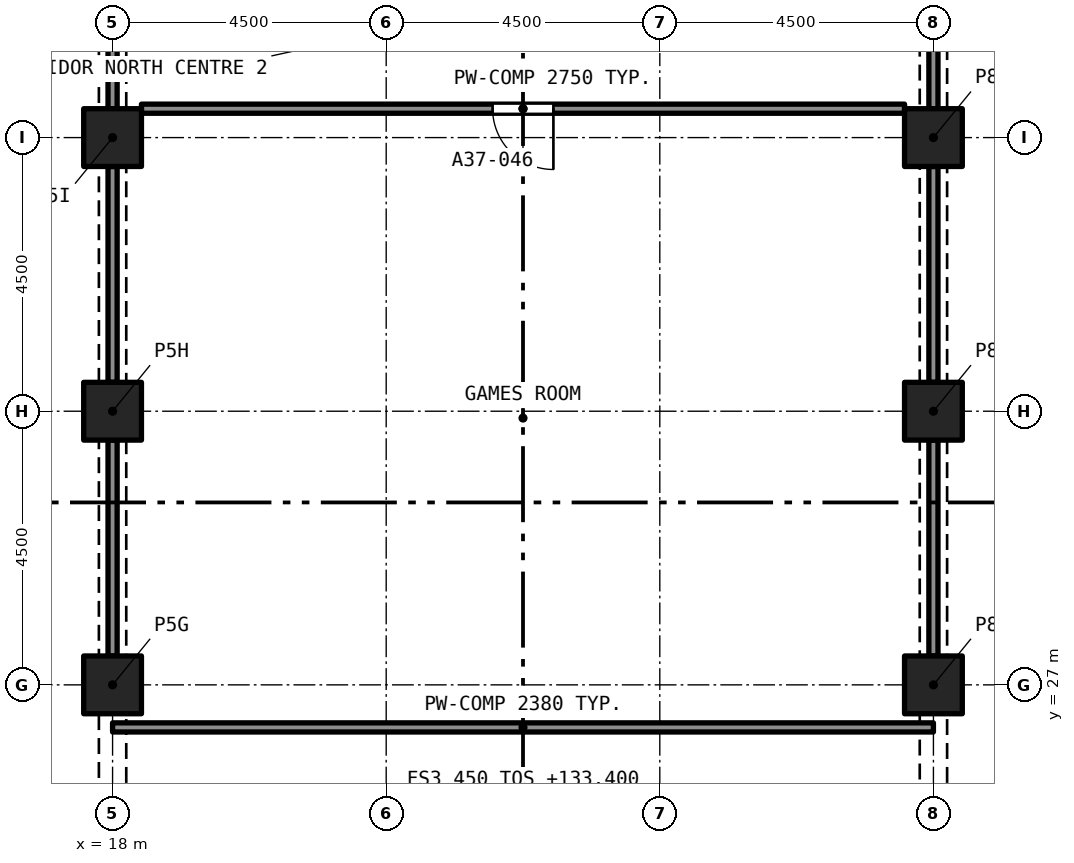
"""IFC4 building model, lengths in metres.
Left out: names, types, materials, properties, quantities, classifications, styles, units other than length and angle.
Written with IfcOpenShell. Run it as: python <this file> out.ifc"""

import sys

from ifc_helpers import new_model, si_unit, direction, frame, frame_2d, origin, origin_2d, place, context, subcontext, project, spatial, rectangle, extrude, element, fill, save


model = new_model("IFC4")
c1 = context("Model", 3, precision=1e-05, world=origin(), true_north=direction((0.0, 1.0)))
c2 = subcontext(c1, "Body", "Model", "MODEL_VIEW")
j1 = project(units=[si_unit("LENGTHUNIT", "METRE"), si_unit("PLANEANGLEUNIT", "RADIAN")], contexts=[c1])
p1 = place(None, origin())
s1 = spatial("IfcSite", under=j1, at=p1, CompositionType="ELEMENT")
p2 = place(p1, origin())
s2 = spatial("IfcBuilding", under=s1, at=p2, CompositionType="ELEMENT")
p3 = place(p2, frame((0.0, 0.0, 133.4)))
s3 = spatial("IfcBuildingStorey", under=s2, at=p3, CompositionType="ELEMENT", Elevation=133.4)
for number, where, z_axis, x_axis in (
    (1, (18.0, 27.0, 0.0), (0.0, 0.0, 1.0), (1.0, 0.0, 0.0)),
    (2, (31.5, 27.0, 0.0), (0.0, 0.0, 1.0), (1.0, 0.0, 0.0)),
    (3, (18.0, 31.5, 0.0), (0.0, 0.0, 1.0), (1.0, 0.0, 0.0)),
    (4, (31.5, 31.5, 0.0), (0.0, 0.0, 1.0), (1.0, 0.0, 0.0)),
    (5, (18.0, 36.0, 0.0), (0.0, 0.0, 1.0), (1.0, 0.0, 0.0)),
    (6, (31.5, 36.0, 0.0), (0.0, 0.0, 1.0), (1.0, 0.0, 0.0)),
):
    element("IfcColumn", number, at=place(p3, frame(where, z_axis=z_axis, x_axis=x_axis)), inside=s3, PredefinedType="COLUMN", context=c2, shape_type="SweptSolid", body=[
        extrude(rectangle(XDim=0.95, YDim=0.95, at=origin_2d()), origin(), (0.0, 0.0, 1.0), 3.2),
    ])
p4 = place(p3, frame((31.025, 36.475, 0.0), z_axis=(0.0, 0.0, 1.0), x_axis=(-1.0, 0.0, 0.0)))
e7 = element("IfcWall", 7, at=p4, inside=s3, PredefinedType="PARTITIONING", context=c2, shape_type="SweptSolid", body=[
    extrude(rectangle(XDim=12.55, YDim=0.15, at=frame_2d((6.275, 0.0))), origin(), (0.0, 0.0, 1.0), 2.75),
])
p5 = place(p4, frame((5.775, 0.0, 0.0)))
e8 = element("IfcOpeningElement", 8, at=p5, cuts=e7, PredefinedType="OPENING", context=c2, shape_type="SweptSolid", body=[
    extrude(rectangle(XDim=1.0, YDim=2.1, at=frame_2d((0.5, 1.05))), frame((0.0, 0.085, 0.0), z_axis=(0.0, -1.0, 0.0), x_axis=(1.0, 0.0, 0.0)), (0.0, 0.0, 1.0), 0.17),
])
p6 = place(p3, frame((31.5, 36.475, 0.0), z_axis=(0.0, 0.0, 1.0), x_axis=(0.0, 1.0, 0.0)))
e9 = element("IfcWall", 9, at=p6, inside=s3, PredefinedType="PARTITIONING", context=c2, shape_type="SweptSolid", body=[
    extrude(rectangle(XDim=3.55, YDim=0.15, at=frame_2d((1.775, 0.0))), origin(), (0.0, 0.0, 1.0), 2.38),
])
p7 = place(p6, frame((1.175, 0.0, 0.0)))
e10 = element("IfcOpeningElement", 10, at=p7, cuts=e9, PredefinedType="OPENING", context=c2, shape_type="SweptSolid", body=[
    extrude(rectangle(XDim=1.2, YDim=2.1, at=frame_2d((0.6, 1.05))), frame((0.0, 0.085, 0.0), z_axis=(0.0, -1.0, 0.0), x_axis=(1.0, 0.0, 0.0)), (0.0, 0.0, 1.0), 0.17),
])
p8 = place(p3, frame((18.0, 40.025, 0.0), z_axis=(0.0, 0.0, 1.0), x_axis=(0.0, -1.0, 0.0)))
e11 = element("IfcWall", 11, at=p8, inside=s3, PredefinedType="PARTITIONING", context=c2, shape_type="SweptSolid", body=[
    extrude(rectangle(XDim=3.55, YDim=0.15, at=frame_2d((1.775, 0.0))), origin(), (0.0, 0.0, 1.0), 2.38),
])
p9 = place(p8, frame((1.175, 0.0, 0.0)))
e12 = element("IfcOpeningElement", 12, at=p9, cuts=e11, PredefinedType="OPENING", context=c2, shape_type="SweptSolid", body=[
    extrude(rectangle(XDim=1.2, YDim=2.1, at=frame_2d((0.6, 1.05))), frame((0.0, 0.085, 0.0), z_axis=(0.0, -1.0, 0.0), x_axis=(1.0, 0.0, 0.0)), (0.0, 0.0, 1.0), 0.17),
])
for number, where, z_axis, x_axis in (
    (13, (31.5, 31.975, 0.0), (0.0, 0.0, 1.0), (0.0, 1.0, 0.0)),
    (14, (31.5, 27.475, 0.0), (0.0, 0.0, 1.0), (0.0, 1.0, 0.0)),
    (15, (18.0, 27.475, 0.0), (0.0, 0.0, 1.0), (0.0, 1.0, 0.0)),
    (16, (18.0, 31.975, 0.0), (0.0, 0.0, 1.0), (0.0, 1.0, 0.0)),
):
    element("IfcWall", number, at=place(p3, frame(where, z_axis=z_axis, x_axis=x_axis)), inside=s3, PredefinedType="PARTITIONING", context=c2, shape_type="SweptSolid", body=[
        extrude(rectangle(XDim=3.55, YDim=0.15, at=frame_2d((1.775, 0.0))), origin(), (0.0, 0.0, 1.0), 2.38),
    ])
p10 = place(p3, frame((18.0, 26.3, 0.0), z_axis=(0.0, 0.0, 1.0), x_axis=(1.0, 0.0, 0.0)))
e17 = element("IfcWall", 17, at=p10, inside=s3, PredefinedType="PARTITIONING", context=c2, shape_type="SweptSolid", body=[
    extrude(rectangle(XDim=13.5, YDim=0.15, at=frame_2d((6.75, 0.0))), origin(), (0.0, 0.0, 1.0), 2.38),
])
p11 = place(p5, origin())
e18 = element("IfcDoor", 18, at=p11, inside=s3, OperationType="SINGLE_SWING_RIGHT", PredefinedType="DOOR", context=c2, shape_type="SweptSolid", body=[
    extrude(rectangle(XDim=1.0, YDim=2.1, at=frame_2d((0.5, 1.05))), frame((0.0, 0.025, 0.0), z_axis=(0.0, -1.0, 0.0), x_axis=(1.0, 0.0, 0.0)), (0.0, 0.0, 1.0), 0.05),
])
fill(e8, e18)
save(model, sys.argv[1])
